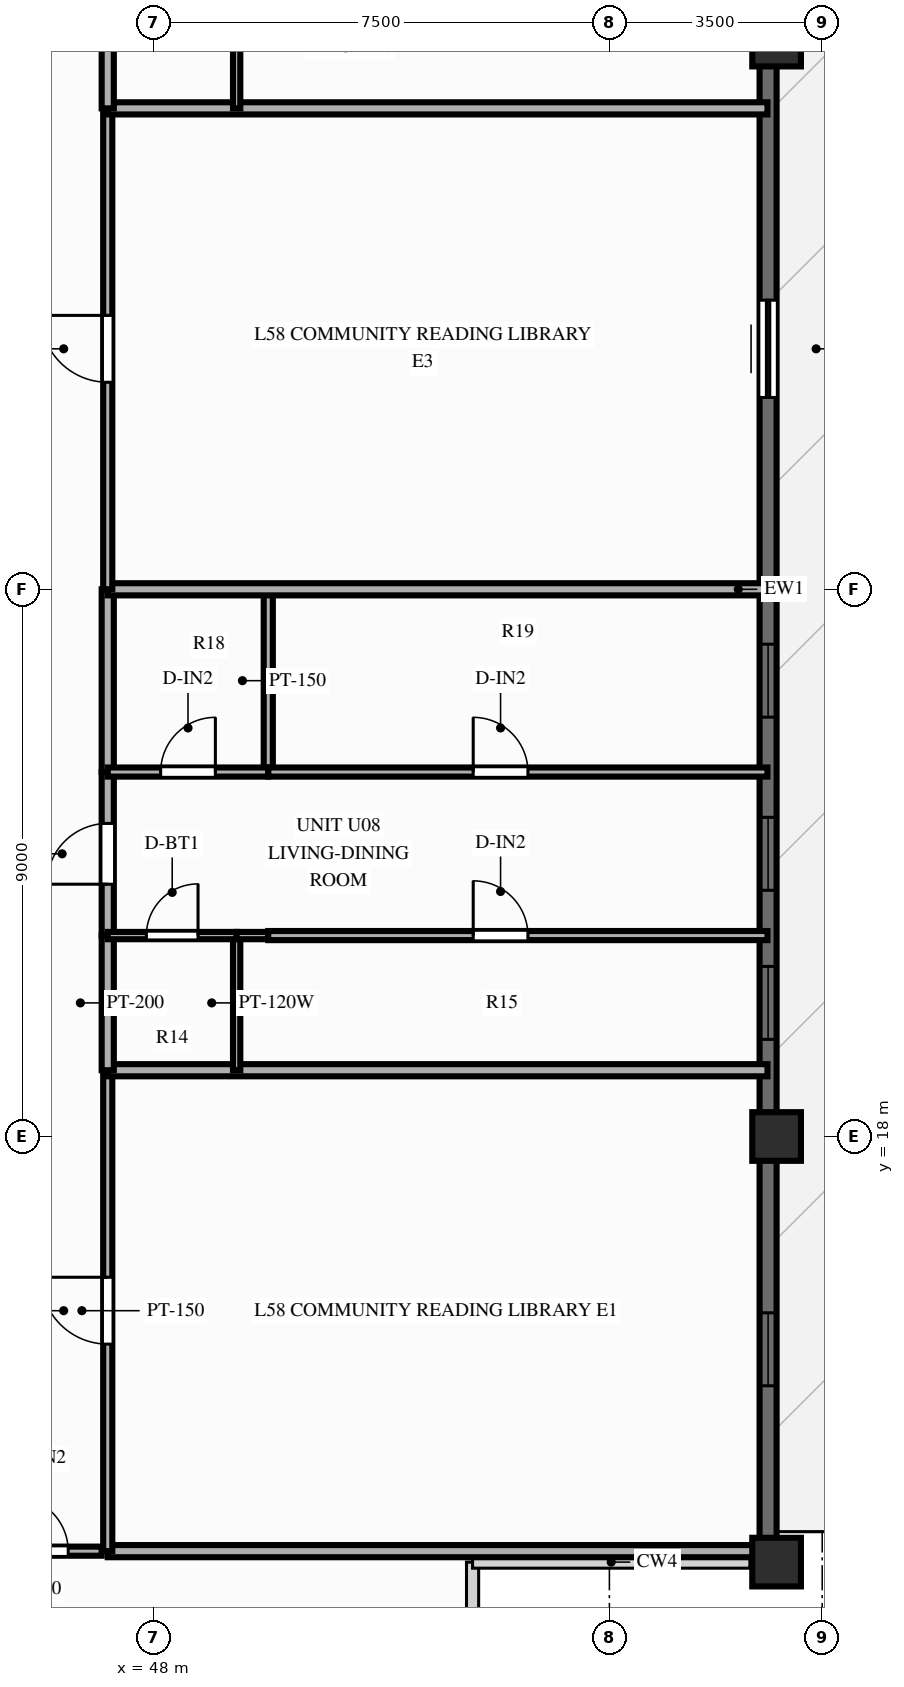
"""IFC4 building model, lengths in metres.
Left out: names, types, materials, properties, quantities, classifications, styles, units other than length and angle.
Written with IfcOpenShell. Run it as: python <this file> out.ifc"""

import sys

from ifc_helpers import new_model, si_unit, direction, frame, frame_2d, origin, origin_2d, place, context, subcontext, project, spatial, rectangle, extrude, source, transform, mapped, element, fill, save


model = new_model("IFC4")
c1 = context("Model", 3, precision=1e-05, world=origin(), true_north=direction((0.0, 1.0)))
c2 = subcontext(c1, "Body", "Model", "MODEL_VIEW")
j1 = project(units=[si_unit("LENGTHUNIT", "METRE"), si_unit("PLANEANGLEUNIT", "RADIAN")], contexts=[c1])
p1 = place(None, origin())
s1 = spatial("IfcSite", under=j1, at=p1, CompositionType="ELEMENT")
p2 = place(p1, origin())
s2 = spatial("IfcBuilding", under=s1, at=p2, CompositionType="ELEMENT")
p3 = place(p2, frame((0.0, 0.0, 186.7)))
s3 = spatial("IfcBuildingStorey", under=s2, at=p3, CompositionType="ELEMENT", Elevation=186.7)
m1 = source(origin(), c2, "Body", "SweptSolid", [
    extrude(rectangle(XDim=0.8, YDim=0.8, at=origin_2d()), origin(), (0.0, 0.0, 1.0), 3.0),
])
for number, where, z_axis, x_axis in (
    (1, (58.25, 11.0, 0.0), (0.0, 0.0, 1.0), (1.0, 0.0, 0.0)),
    (2, (58.25, 18.0, 0.0), (0.0, 0.0, 1.0), (1.0, 0.0, 0.0)),
    (3, (58.25, 36.0, 0.0), (0.0, 0.0, 1.0), (1.0, 0.0, 0.0)),
):
    element("IfcColumn", number, at=place(p3, frame(where, z_axis=z_axis, x_axis=x_axis)), inside=s3, PredefinedType="COLUMN", context=c2, shape_type="MappedRepresentation", body=[
        mapped(m1, transform((0.0, 0.0, 0.0), scale=1.0)),
    ])
p4 = place(p3, frame((58.11, 11.0, 0.0), z_axis=(0.0, 0.0, 1.0), x_axis=(0.0, 1.0, 0.0)))
e4 = element("IfcWall", 4, at=p4, inside=s3, PredefinedType="SOLIDWALL", context=c2, shape_type="SweptSolid", body=[
    extrude(rectangle(XDim=32.0, YDim=0.28, at=frame_2d((16.0, 0.0))), origin(), (0.0, 0.0, 1.0), 2.28),
])
p5 = place(p4, frame((2.9, 0.0, 0.25)))
e5 = element("IfcOpeningElement", 5, at=p5, cuts=e4, PredefinedType="OPENING", context=c2, shape_type="SweptSolid", body=[
    extrude(rectangle(XDim=1.2, YDim=1.5, at=frame_2d((0.6, 0.75))), frame((0.0, 0.152, 0.0), z_axis=(0.0, -1.0, 0.0), x_axis=(1.0, 0.0, 0.0)), (0.0, 0.0, 1.0), 0.304),
])
p6 = place(p4, frame((8.597, 0.0, 0.25)))
e6 = element("IfcOpeningElement", 6, at=p6, cuts=e4, PredefinedType="OPENING", context=c2, shape_type="SweptSolid", body=[
    extrude(rectangle(XDim=1.2, YDim=1.5, at=frame_2d((0.6, 0.75))), frame((0.0, 0.152, 0.0), z_axis=(0.0, -1.0, 0.0), x_axis=(1.0, 0.0, 0.0)), (0.0, 0.0, 1.0), 0.304),
])
p7 = place(p4, frame((11.05, 0.0, 0.25)))
e7 = element("IfcOpeningElement", 7, at=p7, cuts=e4, PredefinedType="OPENING", context=c2, shape_type="SweptSolid", body=[
    extrude(rectangle(XDim=1.2, YDim=1.5, at=frame_2d((0.6, 0.75))), frame((0.0, 0.152, 0.0), z_axis=(0.0, -1.0, 0.0), x_axis=(1.0, 0.0, 0.0)), (0.0, 0.0, 1.0), 0.304),
])
p8 = place(p4, frame((13.897, 0.0, 0.25)))
e8 = element("IfcOpeningElement", 8, at=p8, cuts=e4, PredefinedType="OPENING", context=c2, shape_type="SweptSolid", body=[
    extrude(rectangle(XDim=1.2, YDim=1.5, at=frame_2d((0.6, 0.75))), frame((0.0, 0.152, 0.0), z_axis=(0.0, -1.0, 0.0), x_axis=(1.0, 0.0, 0.0)), (0.0, 0.0, 1.0), 0.304),
])
p9 = place(p4, frame((20.755, 0.0, 0.0), z_axis=(0.0, 0.0, 1.0), x_axis=(-1.0, 0.0, 0.0)))
e9 = element("IfcOpeningElement", 9, at=p9, cuts=e4, PredefinedType="OPENING", context=c2, shape_type="SweptSolid", body=[
    extrude(rectangle(XDim=1.6, YDim=2.15, at=frame_2d((0.8, 1.075))), frame((0.0, 0.152, 0.0), z_axis=(0.0, -1.0, 0.0), x_axis=(1.0, 0.0, 0.0)), (0.0, 0.0, 1.0), 0.304),
])
p10 = place(p4, frame((26.967, 0.0, 0.25)))
e10 = element("IfcOpeningElement", 10, at=p10, cuts=e4, PredefinedType="OPENING", context=c2, shape_type="SweptSolid", body=[
    extrude(rectangle(XDim=1.2, YDim=1.5, at=frame_2d((0.6, 0.75))), frame((0.0, 0.152, 0.0), z_axis=(0.0, -1.0, 0.0), x_axis=(1.0, 0.0, 0.0)), (0.0, 0.0, 1.0), 0.304),
])
p11 = place(p4, frame((29.687, 0.0, 0.25)))
e11 = element("IfcOpeningElement", 11, at=p11, cuts=e4, PredefinedType="OPENING", context=c2, shape_type="SweptSolid", body=[
    extrude(rectangle(XDim=1.2, YDim=1.5, at=frame_2d((0.6, 0.75))), frame((0.0, 0.152, 0.0), z_axis=(0.0, -1.0, 0.0), x_axis=(1.0, 0.0, 0.0)), (0.0, 0.0, 1.0), 0.304),
])
p12 = place(p3, frame((44.82, 11.18, 0.0), z_axis=(0.0, 0.0, 1.0), x_axis=(1.0, 0.0, 0.0)))
e12 = element("IfcWall", 12, at=p12, inside=s3, PredefinedType="PARTITIONING", context=c2, shape_type="SweptSolid", body=[
    extrude(rectangle(XDim=2.33, YDim=0.15, at=frame_2d((1.165, 0.0))), origin(), (0.0, 0.0, 1.0), 2.79),
])
p13 = place(p12, frame((0.88, 0.0, 0.0)))
e13 = element("IfcOpeningElement", 13, at=p13, cuts=e12, PredefinedType="OPENING", context=c2, shape_type="SweptSolid", body=[
    extrude(rectangle(XDim=0.9, YDim=2.1, at=frame_2d((0.45, 1.05))), frame((0.0, 0.087, 0.0), z_axis=(0.0, -1.0, 0.0), x_axis=(1.0, 0.0, 0.0)), (0.0, 0.0, 1.0), 0.174),
])
p14 = place(p3, frame((47.25, 11.18, 0.0), z_axis=(0.0, 0.0, 1.0), x_axis=(1.0, 0.0, 0.0)))
e14 = element("IfcWall", 14, at=p14, inside=s3, PredefinedType="PARTITIONING", context=c2, shape_type="SweptSolid", body=[
    extrude(rectangle(XDim=10.85, YDim=0.2, at=frame_2d((5.425, 0.0))), origin(), (0.0, 0.0, 1.0), 2.79),
])
p15 = place(p3, frame((47.25, 11.18, 0.0), z_axis=(0.0, 0.0, 1.0), x_axis=(0.0, 1.0, 0.0)))
e15 = element("IfcWall", 15, at=p15, inside=s3, PredefinedType="PARTITIONING", context=c2, shape_type="SweptSolid", body=[
    extrude(rectangle(XDim=7.91, YDim=0.15, at=frame_2d((3.955, 0.0))), origin(), (0.0, 0.0, 1.0), 2.79),
])
p16 = place(p15, frame((3.405, 0.0, 0.0)))
e16 = element("IfcOpeningElement", 16, at=p16, cuts=e15, PredefinedType="OPENING", context=c2, shape_type="SweptSolid", body=[
    extrude(rectangle(XDim=1.1, YDim=2.15, at=frame_2d((0.55, 1.075))), frame((0.0, 0.087, 0.0), z_axis=(0.0, -1.0, 0.0), x_axis=(1.0, 0.0, 0.0)), (0.0, 0.0, 1.0), 0.174),
])
p17 = place(p3, frame((47.25, 19.09, 0.0), z_axis=(0.0, 0.0, 1.0), x_axis=(1.0, 0.0, 0.0)))
e17 = element("IfcWall", 17, at=p17, inside=s3, PredefinedType="PARTITIONING", context=c2, shape_type="SweptSolid", body=[
    extrude(rectangle(XDim=10.85, YDim=0.2, at=frame_2d((5.425, 0.0))), origin(), (0.0, 0.0, 1.0), 2.79),
])
p18 = place(p3, frame((47.25, 19.09, 0.0), z_axis=(0.0, 0.0, 1.0), x_axis=(0.0, 1.0, 0.0)))
e18 = element("IfcWall", 18, at=p18, inside=s3, PredefinedType="PARTITIONING", context=c2, shape_type="SweptSolid", body=[
    extrude(rectangle(XDim=2.215, YDim=0.2, at=frame_2d((1.107, 0.0))), origin(), (0.0, 0.0, 1.0), 2.79),
])
p19 = place(p3, frame((47.25, 21.305, 0.0), z_axis=(0.0, 0.0, 1.0), x_axis=(0.0, 1.0, 0.0)))
e19 = element("IfcWall", 19, at=p19, inside=s3, PredefinedType="PARTITIONING", context=c2, shape_type="SweptSolid", body=[
    extrude(rectangle(XDim=2.689, YDim=0.2, at=frame_2d((1.345, 0.0))), origin(), (0.0, 0.0, 1.0), 2.79),
])
p20 = place(p19, frame((0.845, 0.0, 0.0)))
e20 = element("IfcOpeningElement", 20, at=p20, cuts=e19, PredefinedType="OPENING", context=c2, shape_type="SweptSolid", body=[
    extrude(rectangle(XDim=1.0, YDim=2.15, at=frame_2d((0.5, 1.075))), frame((0.0, 0.112, 0.0), z_axis=(0.0, -1.0, 0.0), x_axis=(1.0, 0.0, 0.0)), (0.0, 0.0, 1.0), 0.224),
])
p21 = place(p3, frame((47.25, 23.994, 0.0), z_axis=(0.0, 0.0, 1.0), x_axis=(0.0, 1.0, 0.0)))
e21 = element("IfcWall", 21, at=p21, inside=s3, PredefinedType="PARTITIONING", context=c2, shape_type="SweptSolid", body=[
    extrude(rectangle(XDim=3.006, YDim=0.2, at=frame_2d((1.503, 0.0))), origin(), (0.0, 0.0, 1.0), 2.79),
])
p22 = place(p3, frame((49.37, 19.09, 0.0), z_axis=(0.0, 0.0, 1.0), x_axis=(0.0, 1.0, 0.0)))
e22 = element("IfcWall", 22, at=p22, inside=s3, PredefinedType="PARTITIONING", context=c2, shape_type="SweptSolid", body=[
    extrude(rectangle(XDim=2.215, YDim=0.12, at=frame_2d((1.107, 0.0))), origin(), (0.0, 0.0, 1.0), 2.79),
])
p23 = place(p3, frame((49.89, 23.994, 0.0), z_axis=(0.0, 0.0, 1.0), x_axis=(0.0, 1.0, 0.0)))
e23 = element("IfcWall", 23, at=p23, inside=s3, PredefinedType="PARTITIONING", context=c2, shape_type="SweptSolid", body=[
    extrude(rectangle(XDim=3.006, YDim=0.15, at=frame_2d((1.503, 0.0))), origin(), (0.0, 0.0, 1.0), 2.79),
])
p24 = place(p3, frame((47.25, 21.305, 0.0), z_axis=(0.0, 0.0, 1.0), x_axis=(1.0, 0.0, 0.0)))
e24 = element("IfcWall", 24, at=p24, inside=s3, PredefinedType="PARTITIONING", context=c2, shape_type="SweptSolid", body=[
    extrude(rectangle(XDim=2.12, YDim=0.12, at=frame_2d((1.06, 0.0))), origin(), (0.0, 0.0, 1.0), 2.79),
])
p25 = place(p24, frame((0.635, 0.0, 0.0)))
e25 = element("IfcOpeningElement", 25, at=p25, cuts=e24, PredefinedType="OPENING", context=c2, shape_type="SweptSolid", body=[
    extrude(rectangle(XDim=0.85, YDim=2.05, at=frame_2d((0.425, 1.025))), frame((0.0, 0.072, 0.0), z_axis=(0.0, -1.0, 0.0), x_axis=(1.0, 0.0, 0.0)), (0.0, 0.0, 1.0), 0.144),
])
p26 = place(p3, frame((49.37, 21.305, 0.0), z_axis=(0.0, 0.0, 1.0), x_axis=(1.0, 0.0, 0.0)))
e26 = element("IfcWall", 26, at=p26, inside=s3, PredefinedType="PARTITIONING", context=c2, shape_type="SweptSolid", body=[
    extrude(rectangle(XDim=0.52, YDim=0.12, at=frame_2d((0.26, 0.0))), origin(), (0.0, 0.0, 1.0), 2.79),
])
p27 = place(p3, frame((49.89, 21.305, 0.0), z_axis=(0.0, 0.0, 1.0), x_axis=(1.0, 0.0, 0.0)))
e27 = element("IfcWall", 27, at=p27, inside=s3, PredefinedType="PARTITIONING", context=c2, shape_type="SweptSolid", body=[
    extrude(rectangle(XDim=8.21, YDim=0.15, at=frame_2d((4.105, 0.0))), origin(), (0.0, 0.0, 1.0), 2.79),
])
p28 = place(p27, frame((3.37, 0.0, 0.0)))
e28 = element("IfcOpeningElement", 28, at=p28, cuts=e27, PredefinedType="OPENING", context=c2, shape_type="SweptSolid", body=[
    extrude(rectangle(XDim=0.9, YDim=2.1, at=frame_2d((0.45, 1.05))), frame((0.0, 0.087, 0.0), z_axis=(0.0, -1.0, 0.0), x_axis=(1.0, 0.0, 0.0)), (0.0, 0.0, 1.0), 0.174),
])
p29 = place(p3, frame((47.25, 23.994, 0.0), z_axis=(0.0, 0.0, 1.0), x_axis=(1.0, 0.0, 0.0)))
e29 = element("IfcWall", 29, at=p29, inside=s3, PredefinedType="PARTITIONING", context=c2, shape_type="SweptSolid", body=[
    extrude(rectangle(XDim=2.64, YDim=0.15, at=frame_2d((1.32, 0.0))), origin(), (0.0, 0.0, 1.0), 2.79),
])
p30 = place(p29, frame((0.87, 0.0, 0.0)))
e30 = element("IfcOpeningElement", 30, at=p30, cuts=e29, PredefinedType="OPENING", context=c2, shape_type="SweptSolid", body=[
    extrude(rectangle(XDim=0.9, YDim=2.1, at=frame_2d((0.45, 1.05))), frame((0.0, 0.087, 0.0), z_axis=(0.0, -1.0, 0.0), x_axis=(1.0, 0.0, 0.0)), (0.0, 0.0, 1.0), 0.174),
])
p31 = place(p3, frame((49.89, 23.994, 0.0), z_axis=(0.0, 0.0, 1.0), x_axis=(1.0, 0.0, 0.0)))
e31 = element("IfcWall", 31, at=p31, inside=s3, PredefinedType="PARTITIONING", context=c2, shape_type="SweptSolid", body=[
    extrude(rectangle(XDim=8.21, YDim=0.15, at=frame_2d((4.105, 0.0))), origin(), (0.0, 0.0, 1.0), 2.79),
])
p32 = place(p31, frame((3.37, 0.0, 0.0)))
e32 = element("IfcOpeningElement", 32, at=p32, cuts=e31, PredefinedType="OPENING", context=c2, shape_type="SweptSolid", body=[
    extrude(rectangle(XDim=0.9, YDim=2.1, at=frame_2d((0.45, 1.05))), frame((0.0, 0.087, 0.0), z_axis=(0.0, -1.0, 0.0), x_axis=(1.0, 0.0, 0.0)), (0.0, 0.0, 1.0), 0.174),
])
p33 = place(p3, frame((47.25, 27.0, 0.0), z_axis=(0.0, 0.0, 1.0), x_axis=(1.0, 0.0, 0.0)))
e33 = element("IfcWall", 33, at=p33, inside=s3, PredefinedType="PARTITIONING", context=c2, shape_type="SweptSolid", body=[
    extrude(rectangle(XDim=10.85, YDim=0.2, at=frame_2d((5.425, 0.0))), origin(), (0.0, 0.0, 1.0), 2.79),
])
p34 = place(p3, frame((47.25, 27.0, 0.0), z_axis=(0.0, 0.0, 1.0), x_axis=(0.0, 1.0, 0.0)))
e34 = element("IfcWall", 34, at=p34, inside=s3, PredefinedType="PARTITIONING", context=c2, shape_type="SweptSolid", body=[
    extrude(rectangle(XDim=7.91, YDim=0.15, at=frame_2d((3.955, 0.0))), origin(), (0.0, 0.0, 1.0), 2.79),
])
p35 = place(p34, frame((3.405, 0.0, 0.0)))
e35 = element("IfcOpeningElement", 35, at=p35, cuts=e34, PredefinedType="OPENING", context=c2, shape_type="SweptSolid", body=[
    extrude(rectangle(XDim=1.1, YDim=2.15, at=frame_2d((0.55, 1.075))), frame((0.0, 0.087, 0.0), z_axis=(0.0, -1.0, 0.0), x_axis=(1.0, 0.0, 0.0)), (0.0, 0.0, 1.0), 0.174),
])
p36 = place(p3, frame((47.25, 34.91, 0.0), z_axis=(0.0, 0.0, 1.0), x_axis=(1.0, 0.0, 0.0)))
e36 = element("IfcWall", 36, at=p36, inside=s3, PredefinedType="PARTITIONING", context=c2, shape_type="SweptSolid", body=[
    extrude(rectangle(XDim=10.85, YDim=0.2, at=frame_2d((5.425, 0.0))), origin(), (0.0, 0.0, 1.0), 2.79),
])
p37 = place(p3, frame((47.25, 34.91, 0.0), z_axis=(0.0, 0.0, 1.0), x_axis=(0.0, 1.0, 0.0)))
e37 = element("IfcWall", 37, at=p37, inside=s3, PredefinedType="PARTITIONING", context=c2, shape_type="SweptSolid", body=[
    extrude(rectangle(XDim=2.41, YDim=0.2, at=frame_2d((1.205, 0.0))), origin(), (0.0, 0.0, 1.0), 2.79),
])
p38 = place(p3, frame((49.37, 34.91, 0.0), z_axis=(0.0, 0.0, 1.0), x_axis=(0.0, 1.0, 0.0)))
e38 = element("IfcWall", 38, at=p38, inside=s3, PredefinedType="PARTITIONING", context=c2, shape_type="SweptSolid", body=[
    extrude(rectangle(XDim=2.41, YDim=0.12, at=frame_2d((1.205, 0.0))), origin(), (0.0, 0.0, 1.0), 2.79),
])
m2 = source(origin(), c2, "Body", "SweptSolid", [
    extrude(rectangle(XDim=1.2, YDim=1.5, at=frame_2d((0.6, 0.75))), frame((0.0, 0.03, 0.0), z_axis=(0.0, -1.0, 0.0), x_axis=(1.0, 0.0, 0.0)), (0.0, 0.0, 1.0), 0.06),
])
p39 = place(p5, origin())
e39 = element("IfcWindow", 39, at=p39, inside=s3, PartitioningType="SINGLE_PANEL", PredefinedType="WINDOW", context=c2, shape_type="MappedRepresentation", body=[
    mapped(m2, transform((0.0, 0.0, 0.0), scale=1.0)),
])
fill(e5, e39)
p40 = place(p6, origin())
e40 = element("IfcWindow", 40, at=p40, inside=s3, PartitioningType="SINGLE_PANEL", PredefinedType="WINDOW", context=c2, shape_type="MappedRepresentation", body=[
    mapped(m2, transform((0.0, 0.0, 0.0), scale=1.0)),
])
fill(e6, e40)
p41 = place(p7, origin())
e41 = element("IfcWindow", 41, at=p41, inside=s3, PartitioningType="SINGLE_PANEL", PredefinedType="WINDOW", context=c2, shape_type="MappedRepresentation", body=[
    mapped(m2, transform((0.0, 0.0, 0.0), scale=1.0)),
])
fill(e7, e41)
p42 = place(p8, origin())
e42 = element("IfcWindow", 42, at=p42, inside=s3, PartitioningType="SINGLE_PANEL", PredefinedType="WINDOW", context=c2, shape_type="MappedRepresentation", body=[
    mapped(m2, transform((0.0, 0.0, 0.0), scale=1.0)),
])
fill(e8, e42)
m3 = source(origin(), c2, "Body", "SweptSolid", [
    extrude(rectangle(XDim=1.6, YDim=2.15, at=frame_2d((0.8, 1.075))), frame((0.0, 0.025, 0.0), z_axis=(0.0, -1.0, 0.0), x_axis=(1.0, 0.0, 0.0)), (0.0, 0.0, 1.0), 0.05),
])
p43 = place(p9, origin())
e43 = element("IfcDoor", 43, at=p43, inside=s3, OperationType="SLIDING_TO_LEFT", PredefinedType="DOOR", context=c2, shape_type="MappedRepresentation", body=[
    mapped(m3, transform((0.0, 0.0, 0.0), scale=1.0)),
])
fill(e9, e43)
m4 = source(origin(), c2, "Body", "SweptSolid", [
    extrude(rectangle(XDim=0.9, YDim=2.1, at=frame_2d((0.45, 1.05))), frame((0.0, 0.025, 0.0), z_axis=(0.0, -1.0, 0.0), x_axis=(1.0, 0.0, 0.0)), (0.0, 0.0, 1.0), 0.05),
])
p44 = place(p13, origin())
e44 = element("IfcDoor", 44, at=p44, inside=s3, OperationType="SINGLE_SWING_LEFT", PredefinedType="DOOR", context=c2, shape_type="MappedRepresentation", body=[
    mapped(m4, transform((0.0, 0.0, 0.0), scale=1.0)),
])
fill(e13, e44)
m5 = source(origin(), c2, "Body", "SweptSolid", [
    extrude(rectangle(XDim=1.1, YDim=2.15, at=frame_2d((0.55, 1.075))), frame((0.0, 0.025, 0.0), z_axis=(0.0, -1.0, 0.0), x_axis=(1.0, 0.0, 0.0)), (0.0, 0.0, 1.0), 0.05),
])
p45 = place(p16, origin())
e45 = element("IfcDoor", 45, at=p45, inside=s3, OperationType="SINGLE_SWING_RIGHT", PredefinedType="DOOR", context=c2, shape_type="MappedRepresentation", body=[
    mapped(m5, transform((0.0, 0.0, 0.0), scale=1.0)),
])
fill(e16, e45)
m6 = source(origin(), c2, "Body", "SweptSolid", [
    extrude(rectangle(XDim=1.0, YDim=2.15, at=frame_2d((0.5, 1.075))), frame((0.0, 0.025, 0.0), z_axis=(0.0, -1.0, 0.0), x_axis=(1.0, 0.0, 0.0)), (0.0, 0.0, 1.0), 0.05),
])
p46 = place(p20, origin())
e46 = element("IfcDoor", 46, at=p46, inside=s3, OperationType="SINGLE_SWING_LEFT", PredefinedType="DOOR", context=c2, shape_type="MappedRepresentation", body=[
    mapped(m6, transform((0.0, 0.0, 0.0), scale=1.0)),
])
fill(e20, e46)
m7 = source(origin(), c2, "Body", "SweptSolid", [
    extrude(rectangle(XDim=0.85, YDim=2.05, at=frame_2d((0.425, 1.025))), frame((0.0, 0.025, 0.0), z_axis=(0.0, -1.0, 0.0), x_axis=(1.0, 0.0, 0.0)), (0.0, 0.0, 1.0), 0.05),
])
p47 = place(p25, origin())
e47 = element("IfcDoor", 47, at=p47, inside=s3, OperationType="SINGLE_SWING_RIGHT", PredefinedType="DOOR", context=c2, shape_type="MappedRepresentation", body=[
    mapped(m7, transform((0.0, 0.0, 0.0), scale=1.0)),
])
fill(e25, e47)
p48 = place(p28, origin())
e48 = element("IfcDoor", 48, at=p48, inside=s3, OperationType="SINGLE_SWING_LEFT", PredefinedType="DOOR", context=c2, shape_type="MappedRepresentation", body=[
    mapped(m4, transform((0.0, 0.0, 0.0), scale=1.0)),
])
fill(e28, e48)
p49 = place(p30, origin())
e49 = element("IfcDoor", 49, at=p49, inside=s3, OperationType="SINGLE_SWING_RIGHT", PredefinedType="DOOR", context=c2, shape_type="MappedRepresentation", body=[
    mapped(m4, transform((0.0, 0.0, 0.0), scale=1.0)),
])
fill(e30, e49)
p50 = place(p32, origin())
e50 = element("IfcDoor", 50, at=p50, inside=s3, OperationType="SINGLE_SWING_LEFT", PredefinedType="DOOR", context=c2, shape_type="MappedRepresentation", body=[
    mapped(m4, transform((0.0, 0.0, 0.0), scale=1.0)),
])
fill(e32, e50)
p51 = place(p35, origin())
e51 = element("IfcDoor", 51, at=p51, inside=s3, OperationType="SINGLE_SWING_RIGHT", PredefinedType="DOOR", context=c2, shape_type="MappedRepresentation", body=[
    mapped(m5, transform((0.0, 0.0, 0.0), scale=1.0)),
])
fill(e35, e51)
save(model, sys.argv[1])
